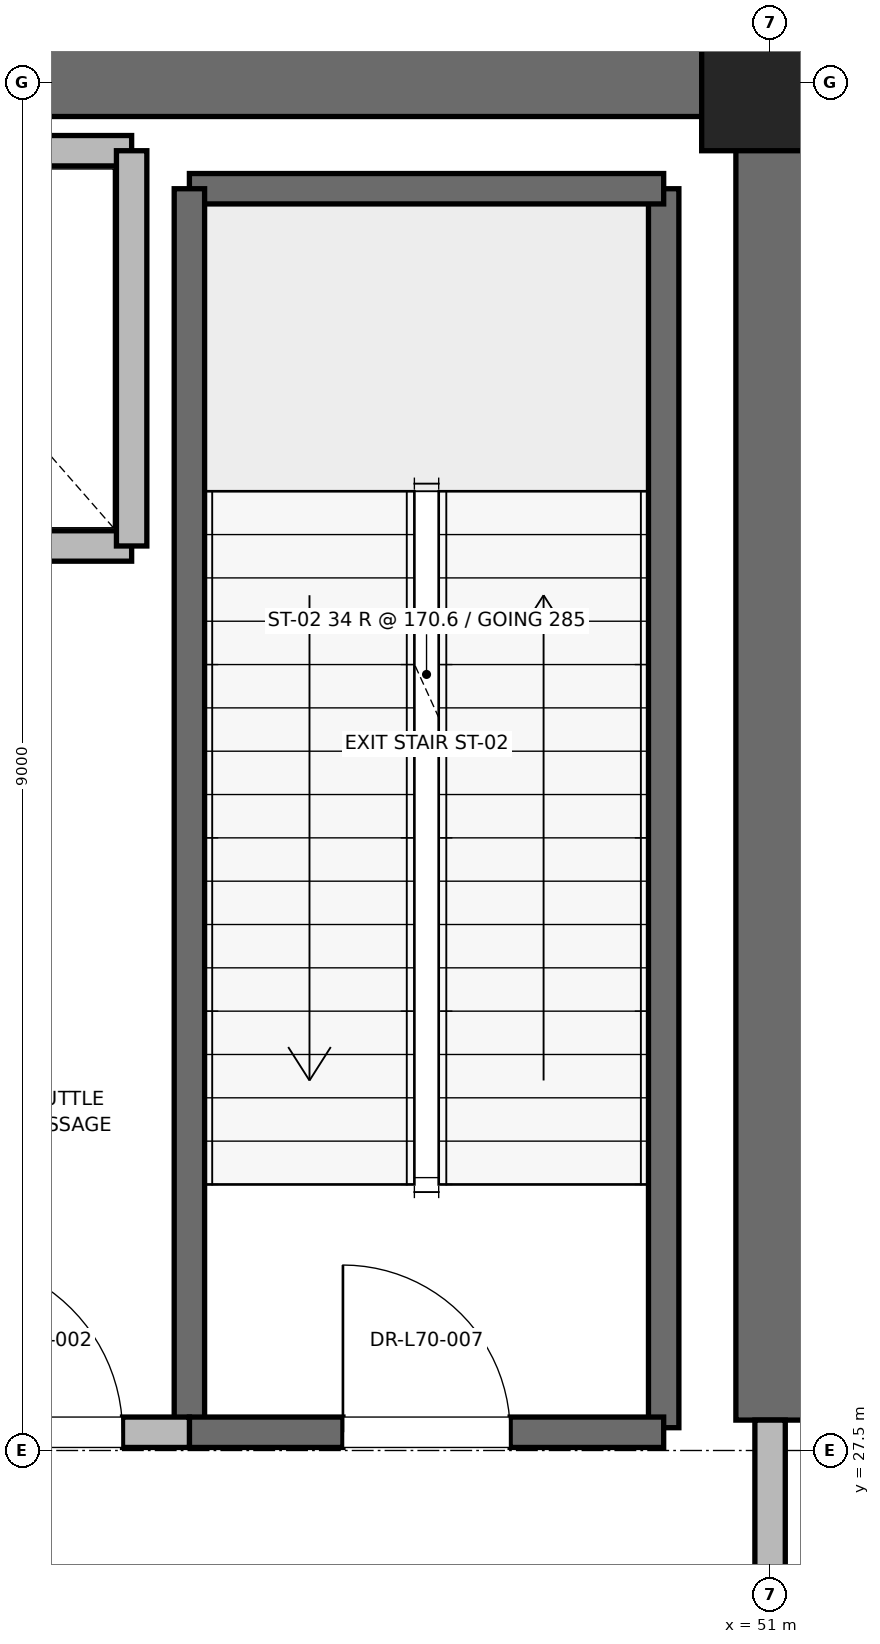
"""IFC4 building model, lengths in metres.
Left out: names, types, materials, properties, quantities, classifications, styles, units other than length and angle.
Written with IfcOpenShell. Run it as: python <this file> out.ifc"""

import sys

from ifc_helpers import new_model, si_unit, direction, frame, frame_2d, origin, origin_2d, place, context, subcontext, project, spatial, rectangle, extrude, element, fill, save


model = new_model("IFC4")
c1 = context("Model", 3, precision=1e-05, world=origin(), true_north=direction((0.0, 1.0)))
c2 = subcontext(c1, "Body", "Model", "MODEL_VIEW")
j1 = project(units=[si_unit("LENGTHUNIT", "METRE"), si_unit("PLANEANGLEUNIT", "RADIAN")], contexts=[c1])
p1 = place(None, origin())
s1 = spatial("IfcSite", under=j1, at=p1, CompositionType="ELEMENT")
p2 = place(p1, origin())
s2 = spatial("IfcBuilding", under=s1, at=p2, CompositionType="ELEMENT")
p3 = place(p2, frame((0.0, 0.0, 301.0)))
s3 = spatial("IfcBuildingStorey", under=s2, at=p3, CompositionType="ELEMENT", Elevation=301.0)
p4 = place(p3, frame((51.0, 36.5, 0.0), z_axis=(0.0, 0.0, 1.0), x_axis=(1.0, 0.0, 0.0)))
e1 = element("IfcColumn", 1, at=p4, inside=s3, PredefinedType="PILASTER", context=c2, shape_type="SweptSolid", body=[
    extrude(rectangle(XDim=0.9, YDim=0.9, at=origin_2d()), origin(), (0.0, 0.0, 1.0), 5.8),
])
p5 = place(p3, frame((45.2, 36.5, 0.0), z_axis=(0.0, 0.0, 1.0), x_axis=(1.0, 0.0, 0.0)))
e2 = element("IfcWall", 2, at=p5, inside=s3, PredefinedType="SHEAR", context=c2, shape_type="SweptSolid", body=[
    extrude(rectangle(XDim=5.8, YDim=0.45, at=frame_2d((2.9, 0.0))), origin(), (0.0, 0.0, 1.0), 5.585),
])
p6 = place(p3, frame((51.0, 27.7, 0.0), z_axis=(0.0, 0.0, 1.0), x_axis=(0.0, 1.0, 0.0)))
e3 = element("IfcWall", 3, at=p6, inside=s3, PredefinedType="SHEAR", context=c2, shape_type="SweptSolid", body=[
    extrude(rectangle(XDim=8.8, YDim=0.45, at=frame_2d((4.4, 0.0))), origin(), (0.0, 0.0, 1.0), 5.585),
])
p7 = place(p3, frame((50.3, 27.65, 0.0), z_axis=(0.0, 0.0, 1.0), x_axis=(0.0, 1.0, 0.0)))
e4 = element("IfcWall", 4, at=p7, inside=s3, PredefinedType="SOLIDWALL", context=c2, shape_type="SweptSolid", body=[
    extrude(rectangle(XDim=8.15, YDim=0.2, at=frame_2d((4.075, 0.0))), origin(), (0.0, 0.0, 1.0), 5.585),
])
p8 = place(p3, frame((47.18, 35.8, 0.0), z_axis=(0.0, 0.0, 1.0), x_axis=(1.0, 0.0, 0.0)))
e5 = element("IfcWall", 5, at=p8, inside=s3, PredefinedType="SOLIDWALL", context=c2, shape_type="SweptSolid", body=[
    extrude(rectangle(XDim=3.12, YDim=0.2, at=frame_2d((1.56, 0.0))), origin(), (0.0, 0.0, 1.0), 5.585),
])
p9 = place(p3, frame((47.18, 27.62, 0.0), z_axis=(0.0, 0.0, 1.0), x_axis=(0.0, 1.0, 0.0)))
e6 = element("IfcWall", 6, at=p9, inside=s3, PredefinedType="SOLIDWALL", context=c2, shape_type="SweptSolid", body=[
    extrude(rectangle(XDim=8.18, YDim=0.2, at=frame_2d((4.09, 0.0))), origin(), (0.0, 0.0, 1.0), 5.585),
])
p10 = place(p3, frame((47.18, 27.62, 0.0), z_axis=(0.0, 0.0, 1.0), x_axis=(1.0, 0.0, 0.0)))
e7 = element("IfcWall", 7, at=p10, inside=s3, PredefinedType="SOLIDWALL", context=c2, shape_type="SweptSolid", body=[
    extrude(rectangle(XDim=3.12, YDim=0.2, at=frame_2d((1.56, 0.0))), origin(), (0.0, 0.0, 1.0), 5.585),
])
p11 = place(p10, frame((1.01, 0.0, 0.0)))
e8 = element("IfcOpeningElement", 8, at=p11, cuts=e7, PredefinedType="OPENING", context=c2, shape_type="SweptSolid", body=[
    extrude(rectangle(XDim=1.1, YDim=2.15, at=frame_2d((0.55, 1.075))), frame((0.0, 0.1, 0.0), z_axis=(0.0, -1.0, 0.0), x_axis=(1.0, 0.0, 0.0)), (0.0, 0.0, 1.0), 0.2),
])
p12 = place(p3, frame((45.15, 27.62, 0.0), z_axis=(0.0, 0.0, 1.0), x_axis=(1.0, 0.0, 0.0)))
e9 = element("IfcWall", 9, at=p12, inside=s3, PredefinedType="PARTITIONING", context=c2, shape_type="SweptSolid", body=[
    extrude(rectangle(XDim=2.03, YDim=0.2, at=frame_2d((1.015, 0.0))), origin(), (0.0, 0.0, 1.0), 5.585),
])
p13 = place(p12, frame((0.44, 0.0, 0.0)))
e10 = element("IfcOpeningElement", 10, at=p13, cuts=e9, PredefinedType="OPENING", context=c2, shape_type="SweptSolid", body=[
    extrude(rectangle(XDim=1.15, YDim=2.2, at=frame_2d((0.575, 1.1))), frame((0.0, 0.1, 0.0), z_axis=(0.0, -1.0, 0.0), x_axis=(1.0, 0.0, 0.0)), (0.0, 0.0, 1.0), 0.2),
])
p14 = place(p3, frame((51.0, 24.3, 0.0), z_axis=(0.0, 0.0, 1.0), x_axis=(0.0, 1.0, 0.0)))
e11 = element("IfcWall", 11, at=p14, inside=s3, PredefinedType="PARTITIONING", context=c2, shape_type="SweptSolid", body=[
    extrude(rectangle(XDim=3.4, YDim=0.2, at=frame_2d((1.7, 0.0))), origin(), (0.0, 0.0, 1.0), 4.665),
])
p15 = place(p14, frame((1.125, 0.0, 0.0)))
e12 = element("IfcOpeningElement", 12, at=p15, cuts=e11, PredefinedType="OPENING", context=c2, shape_type="SweptSolid", body=[
    extrude(rectangle(XDim=1.15, YDim=2.2, at=frame_2d((0.575, 1.1))), frame((0.0, 0.1, 0.0), z_axis=(0.0, -1.0, 0.0), x_axis=(1.0, 0.0, 0.0)), (0.0, 0.0, 1.0), 0.2),
])
p16 = place(p3, frame((44.5, 33.45, 0.0), z_axis=(0.0, 0.0, 1.0), x_axis=(1.0, 0.0, 0.0)))
e13 = element("IfcWall", 13, at=p16, inside=s3, PredefinedType="SOLIDWALL", context=c2, shape_type="SweptSolid", body=[
    extrude(rectangle(XDim=2.3, YDim=0.2, at=frame_2d((1.15, 0.0))), origin(), (0.0, 0.0, 1.0), 5.585),
])
p17 = place(p3, frame((46.8, 36.05, 0.0), z_axis=(0.0, 0.0, 1.0), x_axis=(-1.0, 0.0, 0.0)))
e14 = element("IfcWall", 14, at=p17, inside=s3, PredefinedType="SOLIDWALL", context=c2, shape_type="SweptSolid", body=[
    extrude(rectangle(XDim=2.3, YDim=0.2, at=frame_2d((1.15, 0.0))), origin(), (0.0, 0.0, 1.0), 4.665),
])
p18 = place(p3, frame((46.8, 33.45, 0.0), z_axis=(0.0, 0.0, 1.0), x_axis=(0.0, 1.0, 0.0)))
e15 = element("IfcWall", 15, at=p18, inside=s3, PredefinedType="SOLIDWALL", context=c2, shape_type="SweptSolid", body=[
    extrude(rectangle(XDim=2.6, YDim=0.2, at=frame_2d((1.3, 0.0))), origin(), (0.0, 0.0, 1.0), 5.585),
])
p19 = place(p11, origin())
e16 = element("IfcDoor", 16, at=p19, inside=s3, OperationType="SINGLE_SWING_LEFT", PredefinedType="DOOR", context=c2, shape_type="SweptSolid", body=[
    extrude(rectangle(XDim=1.1, YDim=2.15, at=frame_2d((0.55, 1.075))), frame((0.0, 0.025, 0.0), z_axis=(0.0, -1.0, 0.0), x_axis=(1.0, 0.0, 0.0)), (0.0, 0.0, 1.0), 0.05),
])
fill(e8, e16)
p20 = place(p13, origin())
e17 = element("IfcDoor", 17, at=p20, inside=s3, OperationType="SINGLE_SWING_LEFT", PredefinedType="DOOR", context=c2, shape_type="SweptSolid", body=[
    extrude(rectangle(XDim=1.15, YDim=2.2, at=frame_2d((0.575, 1.1))), frame((0.0, 0.025, 0.0), z_axis=(0.0, -1.0, 0.0), x_axis=(1.0, 0.0, 0.0)), (0.0, 0.0, 1.0), 0.05),
])
fill(e10, e17)
save(model, sys.argv[1])
